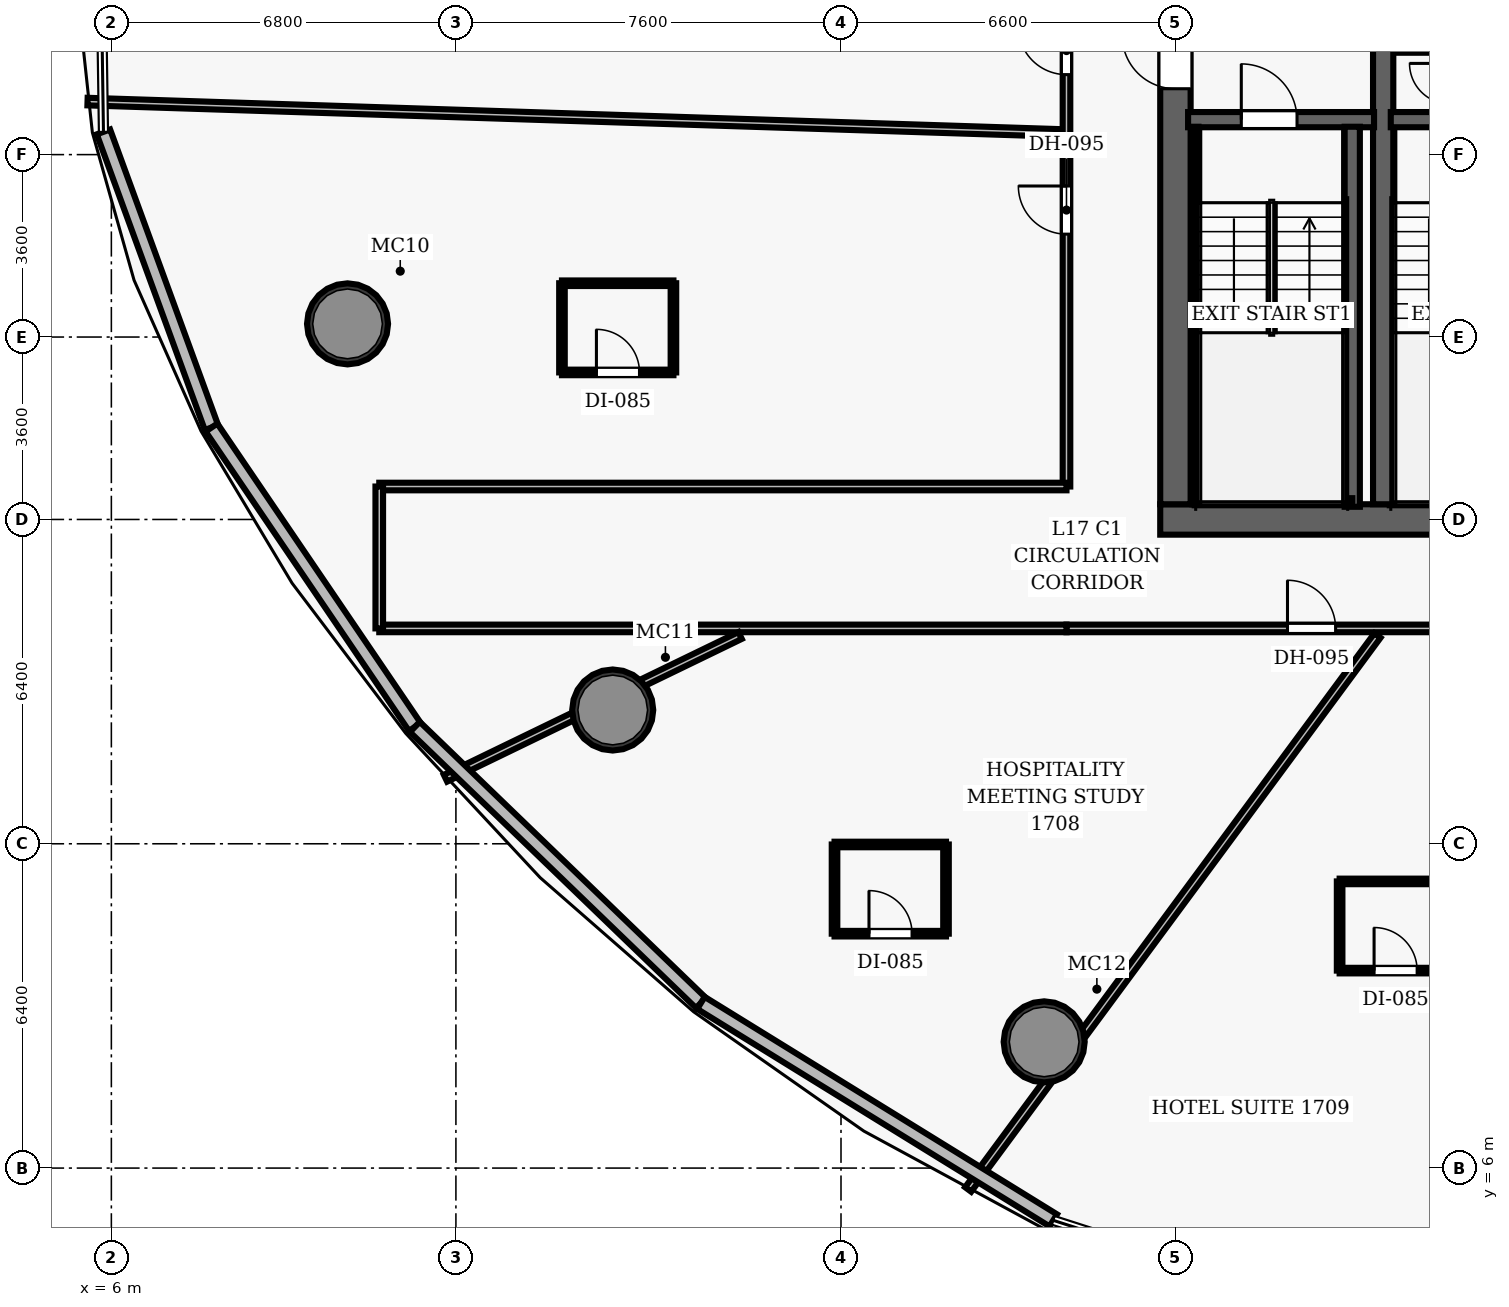
"""IFC4 building model, lengths in metres.
Left out: names, types, materials, properties, quantities, classifications, styles, units other than length and angle.
Written with IfcOpenShell. Run it as: python <this file> out.ifc"""

import sys

from ifc_helpers import new_model, si_unit, direction, frame, frame_2d, origin, origin_2d, place, context, subcontext, project, spatial, rectangle, hollow_circle, extrude, element, fill, save


model = new_model("IFC4")
c1 = context("Model", 3, precision=1e-05, world=origin(), true_north=direction((0.0, 1.0)))
c2 = subcontext(c1, "Body", "Model", "MODEL_VIEW")
j1 = project(units=[si_unit("LENGTHUNIT", "METRE"), si_unit("PLANEANGLEUNIT", "RADIAN")], contexts=[c1])
p1 = place(None, origin())
s1 = spatial("IfcSite", under=j1, at=p1, CompositionType="ELEMENT")
p2 = place(p1, origin())
s2 = spatial("IfcBuilding", under=s1, at=p2, CompositionType="ELEMENT")
p3 = place(p2, frame((0.0, 0.0, 76.4)))
s3 = spatial("IfcBuildingStorey", under=s2, at=p3, CompositionType="ELEMENT", Elevation=76.4)
p4 = place(p3, frame((26.7, 18.8, 0.0), z_axis=(0.0, 0.0, 1.0), x_axis=(1.0, 0.0, 0.0)))
e1 = element("IfcWall", 1, at=p4, inside=s3, PredefinedType="SHEAR", context=c2, shape_type="SweptSolid", body=[
    extrude(rectangle(XDim=22.6, YDim=0.6, at=frame_2d((11.3, 0.0))), origin(), (0.0, 0.0, 1.0), 3.5),
])
p5 = place(p4, frame((14.52, 0.0, 0.0)))
e2 = element("IfcOpeningElement", 2, at=p5, cuts=e1, PredefinedType="OPENING", context=c2, shape_type="SweptSolid", body=[
    extrude(rectangle(XDim=1.05, YDim=2.15, at=frame_2d((0.525, 1.075))), frame((0.0, 0.31, 0.0), z_axis=(0.0, -1.0, 0.0), x_axis=(1.0, 0.0, 0.0)), (0.0, 0.0, 1.0), 0.62),
])
p6 = place(p3, frame((27.0, 19.1, 0.0), z_axis=(0.0, 0.0, 1.0), x_axis=(0.0, 1.0, 0.0)))
e3 = element("IfcWall", 3, at=p6, inside=s3, PredefinedType="SHEAR", context=c2, shape_type="SweptSolid", body=[
    extrude(rectangle(XDim=13.8, YDim=0.6, at=frame_2d((6.9, 0.0))), origin(), (0.0, 0.0, 1.0), 3.5),
])
p7 = place(p6, frame((8.2, 0.0, 0.0)))
e4 = element("IfcOpeningElement", 4, at=p7, cuts=e3, PredefinedType="OPENING", context=c2, shape_type="SweptSolid", body=[
    extrude(rectangle(XDim=1.05, YDim=2.15, at=frame_2d((0.525, 1.075))), frame((0.0, 0.31, 0.0), z_axis=(0.0, -1.0, 0.0), x_axis=(1.0, 0.0, 0.0)), (0.0, 0.0, 1.0), 0.62),
])
p8 = place(p3, frame((31.1, 19.1, 0.0), z_axis=(0.0, 0.0, 1.0), x_axis=(0.0, 1.0, 0.0)))
e5 = element("IfcWall", 5, at=p8, inside=s3, PredefinedType="SHEAR", context=c2, shape_type="SweptSolid", body=[
    extrude(rectangle(XDim=13.8, YDim=0.4, at=frame_2d((6.9, 0.0))), origin(), (0.0, 0.0, 1.0), 3.5),
])
for number, where, z_axis, x_axis in (
    (6, (10.661, 22.66, 0.0), (0.0, 0.0, 1.0), (1.0, 0.0, 0.0)),
    (7, (15.895, 15.04, 0.0), (0.0, 0.0, 1.0), (1.0, 0.0, 0.0)),
    (8, (24.41, 8.491, 0.0), (0.0, 0.0, 1.0), (1.0, 0.0, 0.0)),
):
    element("IfcColumn", number, at=place(p3, frame(where, z_axis=z_axis, x_axis=x_axis)), inside=s3, PredefinedType="COLUMN", context=c2, shape_type="SweptSolid", body=[
        extrude(hollow_circle(Radius=0.8, WallThickness=0.06, at=origin_2d()), origin(), (0.0, 0.0, 1.0), 3.5),
    ])
p9 = place(p3, frame((27.25, 26.69, 0.0), z_axis=(0.0, 0.0, 1.0), x_axis=(1.0, 0.0, 0.0)))
e9 = element("IfcWall", 9, at=p9, inside=s3, PredefinedType="SHEAR", context=c2, shape_type="SweptSolid", body=[
    extrude(rectangle(XDim=3.67, YDim=0.3, at=frame_2d((1.835, 0.0))), origin(), (0.0, 0.0, 1.0), 3.5),
])
p10 = place(p9, frame((1.05, 0.0, 0.0)))
e10 = element("IfcOpeningElement", 10, at=p10, cuts=e9, PredefinedType="OPENING", context=c2, shape_type="SweptSolid", body=[
    extrude(rectangle(XDim=1.1, YDim=2.15, at=frame_2d((0.55, 1.075))), frame((0.0, 0.16, 0.0), z_axis=(0.0, -1.0, 0.0), x_axis=(1.0, 0.0, 0.0)), (0.0, 0.0, 1.0), 0.32),
])
p11 = place(p3, frame((30.49, 19.05, 0.0), z_axis=(0.0, 0.0, 1.0), x_axis=(0.0, 1.0, 0.0)))
e11 = element("IfcWall", 11, at=p11, inside=s3, PredefinedType="SHEAR", context=c2, shape_type="SweptSolid", body=[
    extrude(rectangle(XDim=7.5, YDim=0.3, at=frame_2d((3.75, 0.0))), origin(), (0.0, 0.0, 1.0), 3.5),
])
p12 = place(p3, frame((27.395, 19.1, 0.0), z_axis=(0.0, 0.0, 1.0), x_axis=(0.0, 1.0, 0.0)))
e12 = element("IfcWall", 12, at=p12, inside=s3, PredefinedType="SHEAR", context=c2, shape_type="SweptSolid", body=[
    extrude(rectangle(XDim=7.45, YDim=0.12, at=frame_2d((3.725, 0.0))), origin(), (0.0, 0.0, 1.0), 3.5),
])
p13 = place(p3, frame((27.395, 19.16, 0.0), z_axis=(0.0, 0.0, 1.0), x_axis=(1.0, 0.0, 0.0)))
e13 = element("IfcWall", 13, at=p13, inside=s3, PredefinedType="SHEAR", context=c2, shape_type="SweptSolid", body=[
    extrude(rectangle(XDim=3.095, YDim=0.12, at=frame_2d((1.547, 0.0))), origin(), (0.0, 0.0, 1.0), 3.5),
])
p14 = place(p3, frame((31.25, 26.69, 0.0), z_axis=(0.0, 0.0, 1.0), x_axis=(1.0, 0.0, 0.0)))
e14 = element("IfcWall", 14, at=p14, inside=s3, PredefinedType="SHEAR", context=c2, shape_type="SweptSolid", body=[
    extrude(rectangle(XDim=3.56, YDim=0.3, at=frame_2d((1.78, 0.0))), origin(), (0.0, 0.0, 1.0), 3.5),
])
p15 = place(p14, frame((1.55, 0.0, 0.0)))
e15 = element("IfcOpeningElement", 15, at=p15, cuts=e14, PredefinedType="OPENING", context=c2, shape_type="SweptSolid", body=[
    extrude(rectangle(XDim=1.1, YDim=2.15, at=frame_2d((0.55, 1.075))), frame((0.0, 0.16, 0.0), z_axis=(0.0, -1.0, 0.0), x_axis=(1.0, 0.0, 0.0)), (0.0, 0.0, 1.0), 0.32),
])
p16 = place(p3, frame((31.3, 19.16, 0.0), z_axis=(0.0, 0.0, 1.0), x_axis=(1.0, 0.0, 0.0)))
e16 = element("IfcWall", 16, at=p16, inside=s3, PredefinedType="SHEAR", context=c2, shape_type="SweptSolid", body=[
    extrude(rectangle(XDim=3.04, YDim=0.12, at=frame_2d((1.52, 0.0))), origin(), (0.0, 0.0, 1.0), 3.5),
])
p17 = place(p3, frame((24.85, 16.65, 0.0), z_axis=(0.0, 0.0, 1.0), x_axis=(1.0, 0.0, 0.0)))
e17 = element("IfcWall", 17, at=p17, inside=s3, PredefinedType="PARTITIONING", context=c2, shape_type="SweptSolid", body=[
    extrude(rectangle(XDim=23.5, YDim=0.15, at=frame_2d((11.75, 0.0))), origin(), (0.0, 0.0, 1.0), 2.6),
])
p18 = place(p17, frame((4.362, 0.0, 0.0)))
e18 = element("IfcOpeningElement", 18, at=p18, cuts=e17, PredefinedType="OPENING", context=c2, shape_type="SweptSolid", body=[
    extrude(rectangle(XDim=0.95, YDim=2.15, at=frame_2d((0.475, 1.075))), frame((0.0, 0.085, 0.0), z_axis=(0.0, -1.0, 0.0), x_axis=(1.0, 0.0, 0.0)), (0.0, 0.0, 1.0), 0.17),
])
p19 = place(p17, frame((8.439, 0.0, 0.0)))
e19 = element("IfcOpeningElement", 19, at=p19, cuts=e17, PredefinedType="OPENING", context=c2, shape_type="SweptSolid", body=[
    extrude(rectangle(XDim=0.95, YDim=2.15, at=frame_2d((0.475, 1.075))), frame((0.0, 0.085, 0.0), z_axis=(0.0, -1.0, 0.0), x_axis=(1.0, 0.0, 0.0)), (0.0, 0.0, 1.0), 0.17),
])
p20 = place(p17, frame((14.893, 0.0, 0.0)))
e20 = element("IfcOpeningElement", 20, at=p20, cuts=e17, PredefinedType="OPENING", context=c2, shape_type="SweptSolid", body=[
    extrude(rectangle(XDim=0.95, YDim=2.15, at=frame_2d((0.475, 1.075))), frame((0.0, 0.085, 0.0), z_axis=(0.0, -1.0, 0.0), x_axis=(1.0, 0.0, 0.0)), (0.0, 0.0, 1.0), 0.17),
])
p21 = place(p17, frame((17.475, 0.0, 0.0)))
e21 = element("IfcOpeningElement", 21, at=p21, cuts=e17, PredefinedType="OPENING", context=c2, shape_type="SweptSolid", body=[
    extrude(rectangle(XDim=0.95, YDim=2.15, at=frame_2d((0.475, 1.075))), frame((0.0, 0.085, 0.0), z_axis=(0.0, -1.0, 0.0), x_axis=(1.0, 0.0, 0.0)), (0.0, 0.0, 1.0), 0.17),
])
p22 = place(p3, frame((24.85, 19.45, 0.0), z_axis=(0.0, 0.0, 1.0), x_axis=(0.0, 1.0, 0.0)))
e22 = element("IfcWall", 22, at=p22, inside=s3, PredefinedType="PARTITIONING", context=c2, shape_type="SweptSolid", body=[
    extrude(rectangle(XDim=15.9, YDim=0.15, at=frame_2d((7.95, 0.0))), origin(), (0.0, 0.0, 1.0), 2.6),
])
p23 = place(p22, frame((8.128, 0.0, 0.0)))
e23 = element("IfcOpeningElement", 23, at=p23, cuts=e22, PredefinedType="OPENING", context=c2, shape_type="SweptSolid", body=[
    extrude(rectangle(XDim=0.95, YDim=2.15, at=frame_2d((0.475, 1.075))), frame((0.0, 0.085, 0.0), z_axis=(0.0, -1.0, 0.0), x_axis=(1.0, 0.0, 0.0)), (0.0, 0.0, 1.0), 0.17),
])
p24 = place(p22, frame((4.98, 0.0, 0.0)))
e24 = element("IfcOpeningElement", 24, at=p24, cuts=e22, PredefinedType="OPENING", context=c2, shape_type="SweptSolid", body=[
    extrude(rectangle(XDim=0.95, YDim=2.15, at=frame_2d((0.475, 1.075))), frame((0.0, 0.085, 0.0), z_axis=(0.0, -1.0, 0.0), x_axis=(1.0, 0.0, 0.0)), (0.0, 0.0, 1.0), 0.17),
])
for number, where, z_axis, x_axis in (
    (25, (11.287, 19.45, 0.0), (0.0, 0.0, 1.0), (1.0, 0.0, 0.0)),
    (26, (11.287, 16.65, 0.0), (0.0, 0.0, 1.0), (1.0, 0.0, 0.0)),
):
    element("IfcWall", number, at=place(p3, frame(where, z_axis=z_axis, x_axis=x_axis)), inside=s3, PredefinedType="PARTITIONING", context=c2, shape_type="SweptSolid", body=[
        extrude(rectangle(XDim=13.563, YDim=0.15, at=frame_2d((6.781, 0.0))), origin(), (0.0, 0.0, 1.0), 2.6),
    ])
p25 = place(p3, frame((11.287, 16.65, 0.0), z_axis=(0.0, 0.0, 1.0), x_axis=(0.0, 1.0, 0.0)))
e27 = element("IfcWall", 27, at=p25, inside=s3, PredefinedType="PARTITIONING", context=c2, shape_type="SweptSolid", body=[
    extrude(rectangle(XDim=2.8, YDim=0.15, at=frame_2d((1.4, 0.0))), origin(), (0.0, 0.0, 1.0), 2.6),
])
p26 = place(p3, frame((24.71, 26.428, 0.0), z_axis=(0.0, 0.0, 1.0), x_axis=(-0.999481039659, 0.032212596324, 0.0)))
e28 = element("IfcWall", 28, at=p26, inside=s3, PredefinedType="PARTITIONING", context=c2, shape_type="SweptSolid", body=[
    extrude(rectangle(XDim=19.19, YDim=0.15, at=frame_2d((9.595, 0.0))), origin(), (0.0, 0.0, 1.0), 2.6),
])
p27 = place(p3, frame((18.409, 16.51, 0.0), z_axis=(0.0, 0.0, 1.0), x_axis=(-0.89996418275, -0.435963839977, 0.0)))
e29 = element("IfcWall", 29, at=p27, inside=s3, PredefinedType="PARTITIONING", context=c2, shape_type="SweptSolid", body=[
    extrude(rectangle(XDim=6.461, YDim=0.15, at=frame_2d((3.23, 0.0))), origin(), (0.0, 0.0, 1.0), 2.6),
])
p28 = place(p3, frame((30.988, 16.51, 0.0), z_axis=(0.0, 0.0, 1.0), x_axis=(-0.594280459422, -0.804257878761, 0.0)))
e30 = element("IfcWall", 30, at=p28, inside=s3, PredefinedType="PARTITIONING", context=c2, shape_type="SweptSolid", body=[
    extrude(rectangle(XDim=13.593, YDim=0.15, at=frame_2d((6.796, 0.0))), origin(), (0.0, 0.0, 1.0), 2.6),
])
p29 = place(p3, frame((14.893, 21.702, 0.0), z_axis=(0.0, 0.0, 1.0), x_axis=(1.0, 0.0, 0.0)))
e31 = element("IfcWall", 31, at=p29, inside=s3, PredefinedType="PARTITIONING", context=c2, shape_type="SweptSolid", body=[
    extrude(rectangle(XDim=2.2, YDim=0.11, at=frame_2d((1.1, 0.0))), origin(), (0.0, 0.0, 1.0), 2.6),
])
p30 = place(p29, frame((0.68, 0.0, 0.0)))
e32 = element("IfcOpeningElement", 32, at=p30, cuts=e31, PredefinedType="OPENING", context=c2, shape_type="SweptSolid", body=[
    extrude(rectangle(XDim=0.85, YDim=2.1, at=frame_2d((0.425, 1.05))), frame((0.0, 0.065, 0.0), z_axis=(0.0, -1.0, 0.0), x_axis=(1.0, 0.0, 0.0)), (0.0, 0.0, 1.0), 0.13),
])
p31 = place(p3, frame((14.893, 23.462, 0.0), z_axis=(0.0, 0.0, 1.0), x_axis=(1.0, 0.0, 0.0)))
e33 = element("IfcWall", 33, at=p31, inside=s3, PredefinedType="PARTITIONING", context=c2, shape_type="SweptSolid", body=[
    extrude(rectangle(XDim=2.2, YDim=0.11, at=frame_2d((1.1, 0.0))), origin(), (0.0, 0.0, 1.0), 2.6),
])
for number, where, z_axis, x_axis in (
    (34, (14.893, 21.702, 0.0), (0.0, 0.0, 1.0), (0.0, 1.0, 0.0)),
    (35, (17.093, 21.702, 0.0), (0.0, 0.0, 1.0), (0.0, 1.0, 0.0)),
):
    element("IfcWall", number, at=place(p3, frame(where, z_axis=z_axis, x_axis=x_axis)), inside=s3, PredefinedType="PARTITIONING", context=c2, shape_type="SweptSolid", body=[
        extrude(rectangle(XDim=1.76, YDim=0.11, at=frame_2d((0.88, 0.0))), origin(), (0.0, 0.0, 1.0), 2.6),
    ])
p32 = place(p3, frame((20.272, 10.626, 0.0), z_axis=(0.0, 0.0, 1.0), x_axis=(1.0, 0.0, 0.0)))
e36 = element("IfcWall", 36, at=p32, inside=s3, PredefinedType="PARTITIONING", context=c2, shape_type="SweptSolid", body=[
    extrude(rectangle(XDim=2.2, YDim=0.11, at=frame_2d((1.1, 0.0))), origin(), (0.0, 0.0, 1.0), 2.6),
])
p33 = place(p32, frame((0.68, 0.0, 0.0)))
e37 = element("IfcOpeningElement", 37, at=p33, cuts=e36, PredefinedType="OPENING", context=c2, shape_type="SweptSolid", body=[
    extrude(rectangle(XDim=0.85, YDim=2.1, at=frame_2d((0.425, 1.05))), frame((0.0, 0.065, 0.0), z_axis=(0.0, -1.0, 0.0), x_axis=(1.0, 0.0, 0.0)), (0.0, 0.0, 1.0), 0.13),
])
p34 = place(p3, frame((20.272, 12.386, 0.0), z_axis=(0.0, 0.0, 1.0), x_axis=(1.0, 0.0, 0.0)))
e38 = element("IfcWall", 38, at=p34, inside=s3, PredefinedType="PARTITIONING", context=c2, shape_type="SweptSolid", body=[
    extrude(rectangle(XDim=2.2, YDim=0.11, at=frame_2d((1.1, 0.0))), origin(), (0.0, 0.0, 1.0), 2.6),
])
for number, where, z_axis, x_axis in (
    (39, (20.272, 10.626, 0.0), (0.0, 0.0, 1.0), (0.0, 1.0, 0.0)),
    (40, (22.472, 10.626, 0.0), (0.0, 0.0, 1.0), (0.0, 1.0, 0.0)),
):
    element("IfcWall", number, at=place(p3, frame(where, z_axis=z_axis, x_axis=x_axis)), inside=s3, PredefinedType="PARTITIONING", context=c2, shape_type="SweptSolid", body=[
        extrude(rectangle(XDim=1.76, YDim=0.11, at=frame_2d((0.88, 0.0))), origin(), (0.0, 0.0, 1.0), 2.6),
    ])
p35 = place(p3, frame((30.24, 9.897, 0.0), z_axis=(0.0, 0.0, 1.0), x_axis=(1.0, 0.0, 0.0)))
e41 = element("IfcWall", 41, at=p35, inside=s3, PredefinedType="PARTITIONING", context=c2, shape_type="SweptSolid", body=[
    extrude(rectangle(XDim=2.2, YDim=0.11, at=frame_2d((1.1, 0.0))), origin(), (0.0, 0.0, 1.0), 2.6),
])
p36 = place(p35, frame((0.68, 0.0, 0.0)))
e42 = element("IfcOpeningElement", 42, at=p36, cuts=e41, PredefinedType="OPENING", context=c2, shape_type="SweptSolid", body=[
    extrude(rectangle(XDim=0.85, YDim=2.1, at=frame_2d((0.425, 1.05))), frame((0.0, 0.065, 0.0), z_axis=(0.0, -1.0, 0.0), x_axis=(1.0, 0.0, 0.0)), (0.0, 0.0, 1.0), 0.13),
])
p37 = place(p3, frame((30.24, 11.657, 0.0), z_axis=(0.0, 0.0, 1.0), x_axis=(1.0, 0.0, 0.0)))
e43 = element("IfcWall", 43, at=p37, inside=s3, PredefinedType="PARTITIONING", context=c2, shape_type="SweptSolid", body=[
    extrude(rectangle(XDim=2.2, YDim=0.11, at=frame_2d((1.1, 0.0))), origin(), (0.0, 0.0, 1.0), 2.6),
])
p38 = place(p3, frame((30.24, 9.897, 0.0), z_axis=(0.0, 0.0, 1.0), x_axis=(0.0, 1.0, 0.0)))
e44 = element("IfcWall", 44, at=p38, inside=s3, PredefinedType="PARTITIONING", context=c2, shape_type="SweptSolid", body=[
    extrude(rectangle(XDim=1.76, YDim=0.11, at=frame_2d((0.88, 0.0))), origin(), (0.0, 0.0, 1.0), 2.6),
])
p39 = place(p3, frame((7.976, 20.614, 0.0), z_axis=(0.0, 0.0, 1.0), x_axis=(-0.343216289835, 0.939256396514, 0.0)))
e45 = element("IfcWall", 45, at=p39, inside=s3, PredefinedType="SOLIDWALL", context=c2, shape_type="SweptSolid", body=[
    extrude(rectangle(XDim=6.212, YDim=0.28, at=frame_2d((3.106, 0.0))), origin(), (0.0, 0.0, 1.0), 3.25),
])
p40 = place(p3, frame((11.99, 14.705, 0.0), z_axis=(0.0, 0.0, 1.0), x_axis=(-0.561880829093, 0.827218190019, 0.0)))
e46 = element("IfcWall", 46, at=p40, inside=s3, PredefinedType="SOLIDWALL", context=c2, shape_type="SweptSolid", body=[
    extrude(rectangle(XDim=7.143, YDim=0.28, at=frame_2d((3.571, 0.0))), origin(), (0.0, 0.0, 1.0), 3.25),
])
p41 = place(p3, frame((17.636, 9.259, 0.0), z_axis=(0.0, 0.0, 1.0), x_axis=(-0.719735990423, 0.694247869345, 0.0)))
e47 = element("IfcWall", 47, at=p41, inside=s3, PredefinedType="SOLIDWALL", context=c2, shape_type="SweptSolid", body=[
    extrude(rectangle(XDim=7.845, YDim=0.28, at=frame_2d((3.922, 0.0))), origin(), (0.0, 0.0, 1.0), 3.25),
])
p42 = place(p3, frame((24.589, 4.969, 0.0), z_axis=(0.0, 0.0, 1.0), x_axis=(-0.8510360128, 0.525107327047, 0.0)))
e48 = element("IfcWall", 48, at=p42, inside=s3, PredefinedType="SOLIDWALL", context=c2, shape_type="SweptSolid", body=[
    extrude(rectangle(XDim=8.171, YDim=0.28, at=frame_2d((4.085, 0.0))), origin(), (0.0, 0.0, 1.0), 3.25),
])
p43 = place(p10, origin())
e49 = element("IfcDoor", 49, at=p43, inside=s3, OperationType="SINGLE_SWING_LEFT", PredefinedType="DOOR", context=c2, shape_type="SweptSolid", body=[
    extrude(rectangle(XDim=1.1, YDim=2.15, at=frame_2d((0.55, 1.075))), frame((0.0, 0.025, 0.0), z_axis=(0.0, -1.0, 0.0), x_axis=(1.0, 0.0, 0.0)), (0.0, 0.0, 1.0), 0.05),
])
fill(e10, e49)
p44 = place(p7, origin())
e50 = element("IfcDoor", 50, at=p44, inside=s3, OperationType="SINGLE_SWING_RIGHT", PredefinedType="DOOR", context=c2, shape_type="SweptSolid", body=[
    extrude(rectangle(XDim=1.05, YDim=2.15, at=frame_2d((0.525, 1.075))), frame((0.0, 0.025, 0.0), z_axis=(0.0, -1.0, 0.0), x_axis=(1.0, 0.0, 0.0)), (0.0, 0.0, 1.0), 0.05),
])
fill(e4, e50)
p45 = place(p23, origin())
e51 = element("IfcDoor", 51, at=p45, inside=s3, OperationType="SINGLE_SWING_RIGHT", PredefinedType="DOOR", context=c2, shape_type="SweptSolid", body=[
    extrude(rectangle(XDim=0.95, YDim=2.15, at=frame_2d((0.475, 1.075))), frame((0.0, 0.025, 0.0), z_axis=(0.0, -1.0, 0.0), x_axis=(1.0, 0.0, 0.0)), (0.0, 0.0, 1.0), 0.05),
])
fill(e23, e51)
p46 = place(p24, origin())
e52 = element("IfcDoor", 52, at=p46, inside=s3, OperationType="SINGLE_SWING_RIGHT", PredefinedType="DOOR", context=c2, shape_type="SweptSolid", body=[
    extrude(rectangle(XDim=0.95, YDim=2.15, at=frame_2d((0.475, 1.075))), frame((0.0, 0.025, 0.0), z_axis=(0.0, -1.0, 0.0), x_axis=(1.0, 0.0, 0.0)), (0.0, 0.0, 1.0), 0.05),
])
fill(e24, e52)
p47 = place(p30, origin())
e53 = element("IfcDoor", 53, at=p47, inside=s3, OperationType="SINGLE_SWING_LEFT", PredefinedType="DOOR", context=c2, shape_type="SweptSolid", body=[
    extrude(rectangle(XDim=0.85, YDim=2.1, at=frame_2d((0.425, 1.05))), frame((0.0, 0.025, 0.0), z_axis=(0.0, -1.0, 0.0), x_axis=(1.0, 0.0, 0.0)), (0.0, 0.0, 1.0), 0.05),
])
fill(e32, e53)
p48 = place(p18, origin())
e54 = element("IfcDoor", 54, at=p48, inside=s3, OperationType="SINGLE_SWING_LEFT", PredefinedType="DOOR", context=c2, shape_type="SweptSolid", body=[
    extrude(rectangle(XDim=0.95, YDim=2.15, at=frame_2d((0.475, 1.075))), frame((0.0, 0.025, 0.0), z_axis=(0.0, -1.0, 0.0), x_axis=(1.0, 0.0, 0.0)), (0.0, 0.0, 1.0), 0.05),
])
fill(e18, e54)
p49 = place(p33, origin())
e55 = element("IfcDoor", 55, at=p49, inside=s3, OperationType="SINGLE_SWING_LEFT", PredefinedType="DOOR", context=c2, shape_type="SweptSolid", body=[
    extrude(rectangle(XDim=0.85, YDim=2.1, at=frame_2d((0.425, 1.05))), frame((0.0, 0.025, 0.0), z_axis=(0.0, -1.0, 0.0), x_axis=(1.0, 0.0, 0.0)), (0.0, 0.0, 1.0), 0.05),
])
fill(e37, e55)
p50 = place(p36, origin())
e56 = element("IfcDoor", 56, at=p50, inside=s3, OperationType="SINGLE_SWING_LEFT", PredefinedType="DOOR", context=c2, shape_type="SweptSolid", body=[
    extrude(rectangle(XDim=0.85, YDim=2.1, at=frame_2d((0.425, 1.05))), frame((0.0, 0.025, 0.0), z_axis=(0.0, -1.0, 0.0), x_axis=(1.0, 0.0, 0.0)), (0.0, 0.0, 1.0), 0.05),
])
fill(e42, e56)
save(model, sys.argv[1])
